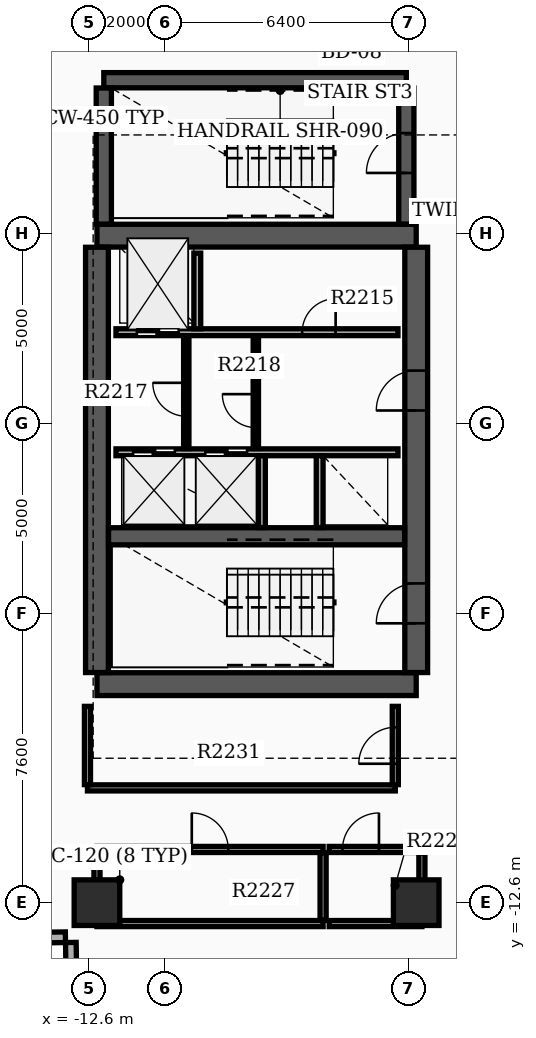
"""IFC4 building model, lengths in metres.
Left out: names, types, materials, properties, quantities, classifications, styles, units other than length and angle.
Written with IfcOpenShell. Run it as: python <this file> out.ifc"""

import sys

from ifc_helpers import new_model, si_unit, direction, frame, frame_2d, origin, origin_2d, place, context, subcontext, project, spatial, rectangle, extrude, element, fill, save


model = new_model("IFC4")
c1 = context("Model", 3, precision=1e-05, world=origin(), true_north=direction((0.0, 1.0)))
c2 = subcontext(c1, "Body", "Model", "MODEL_VIEW")
j1 = project(units=[si_unit("LENGTHUNIT", "METRE"), si_unit("PLANEANGLEUNIT", "RADIAN")], contexts=[c1])
p1 = place(None, origin())
s1 = spatial("IfcSite", under=j1, at=p1, CompositionType="ELEMENT")
p2 = place(p1, origin())
s2 = spatial("IfcBuilding", under=s1, at=p2, CompositionType="ELEMENT")
p3 = place(p2, frame((0.0, 0.0, 139.8)))
s3 = spatial("IfcBuildingStorey", under=s2, at=p3, CompositionType="ELEMENT", Elevation=139.8)
for number, where, z_axis, x_axis in (
    (1, (-12.4, -6.85, 0.0), (0.0, 0.0, 1.0), (1.0, 0.0, 0.0)),
    (2, (-12.4, 4.95, 0.0), (0.0, 0.0, 1.0), (1.0, 0.0, 0.0)),
):
    element("IfcWall", number, at=place(p3, frame(where, z_axis=z_axis, x_axis=x_axis)), inside=s3, PredefinedType="SHEAR", context=c2, shape_type="SweptSolid", body=[
        extrude(rectangle(XDim=8.4, YDim=0.6, at=frame_2d((4.2, 0.0))), origin(), (0.0, 0.0, 1.0), 3.65),
    ])
p4 = place(p3, frame((-12.4, -6.545, 0.0), z_axis=(0.0, 0.0, 1.0), x_axis=(0.0, 1.0, 0.0)))
e3 = element("IfcWall", 3, at=p4, inside=s3, PredefinedType="SHEAR", context=c2, shape_type="SweptSolid", body=[
    extrude(rectangle(XDim=11.19, YDim=0.6, at=frame_2d((5.595, 0.0))), origin(), (0.0, 0.0, 1.0), 3.65),
])
p5 = place(p3, frame((-4.0, -6.545, 0.0), z_axis=(0.0, 0.0, 1.0), x_axis=(0.0, 1.0, 0.0)))
e4 = element("IfcWall", 4, at=p5, inside=s3, PredefinedType="SHEAR", context=c2, shape_type="SweptSolid", body=[
    extrude(rectangle(XDim=11.19, YDim=0.6, at=frame_2d((5.595, 0.0))), origin(), (0.0, 0.0, 1.0), 3.65),
])
p6 = place(p5, frame((1.295, 0.0, 0.0)))
e5 = element("IfcOpeningElement", 5, at=p6, cuts=e4, PredefinedType="OPENING", context=c2, shape_type="SweptSolid", body=[
    extrude(rectangle(XDim=1.05, YDim=2.15, at=frame_2d((0.525, 1.075))), frame((0.0, 0.31, 0.0), z_axis=(0.0, -1.0, 0.0), x_axis=(1.0, 0.0, 0.0)), (0.0, 0.0, 1.0), 0.62),
])
p7 = place(p5, frame((6.895, 0.0, 0.0)))
e6 = element("IfcOpeningElement", 6, at=p7, cuts=e4, PredefinedType="OPENING", context=c2, shape_type="SweptSolid", body=[
    extrude(rectangle(XDim=1.05, YDim=2.15, at=frame_2d((0.525, 1.075))), frame((0.0, 0.31, 0.0), z_axis=(0.0, -1.0, 0.0), x_axis=(1.0, 0.0, 0.0)), (0.0, 0.0, 1.0), 0.62),
])
p8 = place(p3, frame((-12.095, -2.96, 0.0), z_axis=(0.0, 0.0, 1.0), x_axis=(1.0, 0.0, 0.0)))
e7 = element("IfcWall", 7, at=p8, inside=s3, PredefinedType="SHEAR", context=c2, shape_type="SweptSolid", body=[
    extrude(rectangle(XDim=7.79, YDim=0.45, at=frame_2d((3.895, 0.0))), origin(), (0.0, 0.0, 1.0), 3.65),
])
p9 = place(p3, frame((-12.22, 9.04, 0.0), z_axis=(0.0, 0.0, 1.0), x_axis=(1.0, 0.0, 0.0)))
e8 = element("IfcWall", 8, at=p9, inside=s3, PredefinedType="SHEAR", context=c2, shape_type="SweptSolid", body=[
    extrude(rectangle(XDim=7.96, YDim=0.4, at=frame_2d((3.98, 0.0))), origin(), (0.0, 0.0, 1.0), 3.65),
])
p10 = place(p3, frame((-12.22, 5.255, 0.0), z_axis=(0.0, 0.0, 1.0), x_axis=(0.0, 1.0, 0.0)))
e9 = element("IfcWall", 9, at=p10, inside=s3, PredefinedType="SHEAR", context=c2, shape_type="SweptSolid", body=[
    extrude(rectangle(XDim=3.58, YDim=0.4, at=frame_2d((1.79, 0.0))), origin(), (0.0, 0.0, 1.0), 3.65),
])
p11 = place(p3, frame((-4.26, 5.255, 0.0), z_axis=(0.0, 0.0, 1.0), x_axis=(0.0, 1.0, 0.0)))
e10 = element("IfcWall", 10, at=p11, inside=s3, PredefinedType="SHEAR", context=c2, shape_type="SweptSolid", body=[
    extrude(rectangle(XDim=3.58, YDim=0.4, at=frame_2d((1.79, 0.0))), origin(), (0.0, 0.0, 1.0), 3.65),
])
p12 = place(p11, frame((1.345, 0.0, 0.0)))
e11 = element("IfcOpeningElement", 11, at=p12, cuts=e10, PredefinedType="OPENING", context=c2, shape_type="SweptSolid", body=[
    extrude(rectangle(XDim=1.05, YDim=2.15, at=frame_2d((0.525, 1.075))), frame((0.0, 0.21, 0.0), z_axis=(0.0, -1.0, 0.0), x_axis=(1.0, 0.0, 0.0)), (0.0, 0.0, 1.0), 0.42),
])
for number, where, z_axis, x_axis in (
    (12, (-12.4, -12.6, 0.0), (0.0, 0.0, 1.0), (1.0, 0.0, 0.0)),
    (13, (-4.0, -12.6, 0.0), (0.0, 0.0, 1.0), (1.0, 0.0, 0.0)),
):
    element("IfcColumn", number, at=place(p3, frame(where, z_axis=z_axis, x_axis=x_axis)), inside=s3, PredefinedType="COLUMN", context=c2, shape_type="SweptSolid", body=[
        extrude(rectangle(XDim=1.2, YDim=1.2, at=origin_2d()), origin(), (0.0, 0.0, 1.0), 3.9),
    ])
p13 = place(p3, frame((-14.449, -13.529, 0.0), z_axis=(0.0, 0.0, 1.0), x_axis=(0.999878147354, 0.015610587569, 0.0)))
e14 = element("IfcWall", 14, at=p13, inside=s3, PredefinedType="STANDARD", context=c2, shape_type="SweptSolid", body=[
    extrude(rectangle(XDim=1.22, YDim=0.28, at=frame_2d((0.61, 0.0))), origin(), (0.0, 0.0, 1.0), 2.92),
])
p14 = place(p3, frame((-13.087, -13.647, 0.0), z_axis=(0.0, 0.0, 1.0), x_axis=(0.015785793208, -0.999875396603, 0.0)))
e15 = element("IfcWall", 15, at=p14, inside=s3, PredefinedType="STANDARD", context=c2, shape_type="SweptSolid", body=[
    extrude(rectangle(XDim=1.5, YDim=0.28, at=frame_2d((0.75, 0.0))), origin(), (0.0, 0.0, 1.0), 2.92),
])
p15 = place(p3, frame((-11.9, 2.41, 0.0), z_axis=(0.0, 0.0, 1.0), x_axis=(1.0, 0.0, 0.0)))
e16 = element("IfcWall", 16, at=p15, inside=s3, PredefinedType="SOLIDWALL", context=c2, shape_type="SweptSolid", body=[
    extrude(rectangle(XDim=7.42, YDim=0.18, at=frame_2d((3.71, 0.0))), origin(), (0.0, 0.0, 1.0), 2.91),
])
p16 = place(p15, frame((0.55, 0.0, 0.0)))
e17 = element("IfcOpeningElement", 17, at=p16, cuts=e16, PredefinedType="OPENING", context=c2, shape_type="SweptSolid", body=[
    extrude(rectangle(XDim=1.1, YDim=2.15, at=frame_2d((0.55, 1.075))), frame((0.0, 0.1, 0.0), z_axis=(0.0, -1.0, 0.0), x_axis=(1.0, 0.0, 0.0)), (0.0, 0.0, 1.0), 0.2),
])
p17 = place(p15, frame((4.9, 0.0, 0.0)))
e18 = element("IfcOpeningElement", 18, at=p17, cuts=e16, PredefinedType="OPENING", context=c2, shape_type="SweptSolid", body=[
    extrude(rectangle(XDim=0.88, YDim=2.1, at=frame_2d((0.44, 1.05))), frame((0.0, 0.1, 0.0), z_axis=(0.0, -1.0, 0.0), x_axis=(1.0, 0.0, 0.0)), (0.0, 0.0, 1.0), 0.2),
])
p18 = place(p3, frame((-11.9, -0.75, 0.0), z_axis=(0.0, 0.0, 1.0), x_axis=(1.0, 0.0, 0.0)))
e19 = element("IfcWall", 19, at=p18, inside=s3, PredefinedType="SOLIDWALL", context=c2, shape_type="SweptSolid", body=[
    extrude(rectangle(XDim=7.42, YDim=0.18, at=frame_2d((3.71, 0.0))), origin(), (0.0, 0.0, 1.0), 2.91),
])
p19 = place(p18, frame((0.45, 0.0, 0.0)))
e20 = element("IfcOpeningElement", 20, at=p19, cuts=e19, PredefinedType="OPENING", context=c2, shape_type="SweptSolid", body=[
    extrude(rectangle(XDim=1.1, YDim=2.15, at=frame_2d((0.55, 1.075))), frame((0.0, 0.1, 0.0), z_axis=(0.0, -1.0, 0.0), x_axis=(1.0, 0.0, 0.0)), (0.0, 0.0, 1.0), 0.2),
])
p20 = place(p18, frame((2.35, 0.0, 0.0)))
e21 = element("IfcOpeningElement", 21, at=p20, cuts=e19, PredefinedType="OPENING", context=c2, shape_type="SweptSolid", body=[
    extrude(rectangle(XDim=1.1, YDim=2.15, at=frame_2d((0.55, 1.075))), frame((0.0, 0.1, 0.0), z_axis=(0.0, -1.0, 0.0), x_axis=(1.0, 0.0, 0.0)), (0.0, 0.0, 1.0), 0.2),
])
p21 = place(p3, frame((-9.76, 2.5, 0.0), z_axis=(0.0, 0.0, 1.0), x_axis=(0.0, 1.0, 0.0)))
e22 = element("IfcWall", 22, at=p21, inside=s3, PredefinedType="SOLIDWALL", context=c2, shape_type="SweptSolid", body=[
    extrude(rectangle(XDim=1.99, YDim=0.18, at=frame_2d((0.995, 0.0))), origin(), (0.0, 0.0, 1.0), 2.91),
])
for number, where, z_axis, x_axis in (
    (23, (-8.06, -2.73, 0.0), (0.0, 0.0, 1.0), (0.0, 1.0, 0.0)),
    (24, (-6.54, -2.73, 0.0), (0.0, 0.0, 1.0), (0.0, 1.0, 0.0)),
):
    element("IfcWall", number, at=place(p3, frame(where, z_axis=z_axis, x_axis=x_axis)), inside=s3, PredefinedType="SOLIDWALL", context=c2, shape_type="SweptSolid", body=[
        extrude(rectangle(XDim=1.89, YDim=0.18, at=frame_2d((0.945, 0.0))), origin(), (0.0, 0.0, 1.0), 2.91),
    ])
p22 = place(p3, frame((-8.22, -0.65, 0.0), z_axis=(0.0, 0.0, 1.0), x_axis=(0.0, 1.0, 0.0)))
e25 = element("IfcWall", 25, at=p22, inside=s3, PredefinedType="SOLIDWALL", context=c2, shape_type="SweptSolid", body=[
    extrude(rectangle(XDim=2.96, YDim=0.14, at=frame_2d((1.48, 0.0))), origin(), (0.0, 0.0, 1.0), 2.91),
])
p23 = place(p22, frame((0.55, 0.0, 0.0)))
e26 = element("IfcOpeningElement", 26, at=p23, cuts=e25, PredefinedType="OPENING", context=c2, shape_type="SweptSolid", body=[
    extrude(rectangle(XDim=0.88, YDim=2.1, at=frame_2d((0.44, 1.05))), frame((0.0, 0.08, 0.0), z_axis=(0.0, -1.0, 0.0), x_axis=(1.0, 0.0, 0.0)), (0.0, 0.0, 1.0), 0.16),
])
p24 = place(p3, frame((-10.05, -0.652, 0.0), z_axis=(0.0, 0.0, 1.0), x_axis=(0.0, 1.0, 0.0)))
e27 = element("IfcWall", 27, at=p24, inside=s3, PredefinedType="PARTITIONING", context=c2, shape_type="SweptSolid", body=[
    extrude(rectangle(XDim=2.962, YDim=0.14, at=frame_2d((1.481, 0.0))), origin(), (0.0, 0.0, 1.0), 2.91),
])
p25 = place(p24, frame((0.85, 0.0, 0.0)))
e28 = element("IfcOpeningElement", 28, at=p25, cuts=e27, PredefinedType="OPENING", context=c2, shape_type="SweptSolid", body=[
    extrude(rectangle(XDim=0.88, YDim=2.1, at=frame_2d((0.44, 1.05))), frame((0.0, 0.08, 0.0), z_axis=(0.0, -1.0, 0.0), x_axis=(1.0, 0.0, 0.0)), (0.0, 0.0, 1.0), 0.16),
])
p26 = place(p3, frame((-12.4, -13.15, 0.0), z_axis=(0.0, 0.0, 1.0), x_axis=(1.0, 0.0, 0.0)))
e29 = element("IfcWall", 29, at=p26, inside=s3, PredefinedType="PARTITIONING", context=c2, shape_type="SweptSolid", body=[
    extrude(rectangle(XDim=5.95, YDim=0.16, at=frame_2d((2.975, 0.0))), origin(), (0.0, 0.0, 1.0), 2.91),
])
p27 = place(p3, frame((-12.4, -11.2, 0.0), z_axis=(0.0, 0.0, 1.0), x_axis=(1.0, 0.0, 0.0)))
e30 = element("IfcWall", 30, at=p27, inside=s3, PredefinedType="PARTITIONING", context=c2, shape_type="SweptSolid", body=[
    extrude(rectangle(XDim=5.95, YDim=0.16, at=frame_2d((2.975, 0.0))), origin(), (0.0, 0.0, 1.0), 2.91),
])
p28 = place(p27, frame((2.495, 0.0, 0.0)))
e31 = element("IfcOpeningElement", 31, at=p28, cuts=e30, PredefinedType="OPENING", context=c2, shape_type="SweptSolid", body=[
    extrude(rectangle(XDim=0.96, YDim=2.15, at=frame_2d((0.48, 1.075))), frame((0.0, 0.09, 0.0), z_axis=(0.0, -1.0, 0.0), x_axis=(1.0, 0.0, 0.0)), (0.0, 0.0, 1.0), 0.18),
])
for number, where, z_axis, x_axis in (
    (32, (-12.4, -13.065, 0.0), (0.0, 0.0, 1.0), (0.0, 1.0, 0.0)),
    (33, (-6.45, -13.065, 0.0), (0.0, 0.0, 1.0), (0.0, 1.0, 0.0)),
):
    element("IfcWall", number, at=place(p3, frame(where, z_axis=z_axis, x_axis=x_axis)), inside=s3, PredefinedType="PARTITIONING", context=c2, shape_type="SweptSolid", body=[
        extrude(rectangle(XDim=1.78, YDim=0.16, at=frame_2d((0.89, 0.0))), origin(), (0.0, 0.0, 1.0), 2.91),
    ])
p29 = place(p3, frame((-6.29, -13.15, 0.0), z_axis=(0.0, 0.0, 1.0), x_axis=(1.0, 0.0, 0.0)))
e34 = element("IfcWall", 34, at=p29, inside=s3, PredefinedType="PARTITIONING", context=c2, shape_type="SweptSolid", body=[
    extrude(rectangle(XDim=2.44, YDim=0.16, at=frame_2d((1.22, 0.0))), origin(), (0.0, 0.0, 1.0), 2.91),
])
p30 = place(p3, frame((-6.29, -11.2, 0.0), z_axis=(0.0, 0.0, 1.0), x_axis=(1.0, 0.0, 0.0)))
e35 = element("IfcWall", 35, at=p30, inside=s3, PredefinedType="PARTITIONING", context=c2, shape_type="SweptSolid", body=[
    extrude(rectangle(XDim=2.44, YDim=0.16, at=frame_2d((1.22, 0.0))), origin(), (0.0, 0.0, 1.0), 2.91),
])
p31 = place(p30, frame((0.35, 0.0, 0.0)))
e36 = element("IfcOpeningElement", 36, at=p31, cuts=e35, PredefinedType="OPENING", context=c2, shape_type="SweptSolid", body=[
    extrude(rectangle(XDim=0.96, YDim=2.15, at=frame_2d((0.48, 1.075))), frame((0.0, 0.09, 0.0), z_axis=(0.0, -1.0, 0.0), x_axis=(1.0, 0.0, 0.0)), (0.0, 0.0, 1.0), 0.18),
])
p32 = place(p3, frame((-3.85, -13.065, 0.0), z_axis=(0.0, 0.0, 1.0), x_axis=(0.0, 1.0, 0.0)))
e37 = element("IfcWall", 37, at=p32, inside=s3, PredefinedType="PARTITIONING", context=c2, shape_type="SweptSolid", body=[
    extrude(rectangle(XDim=1.78, YDim=0.16, at=frame_2d((0.89, 0.0))), origin(), (0.0, 0.0, 1.0), 2.91),
])
p33 = place(p3, frame((-12.65, -9.58, 0.0), z_axis=(0.0, 0.0, 1.0), x_axis=(1.0, 0.0, 0.0)))
e38 = element("IfcWall", 38, at=p33, inside=s3, PredefinedType="PARTITIONING", context=c2, shape_type="SweptSolid", body=[
    extrude(rectangle(XDim=8.1, YDim=0.16, at=frame_2d((4.05, 0.0))), origin(), (0.0, 0.0, 1.0), 2.91),
])
p34 = place(p3, frame((-12.65, -9.495, 0.0), z_axis=(0.0, 0.0, 1.0), x_axis=(0.0, 1.0, 0.0)))
e39 = element("IfcWall", 39, at=p34, inside=s3, PredefinedType="PARTITIONING", context=c2, shape_type="SweptSolid", body=[
    extrude(rectangle(XDim=2.06, YDim=0.16, at=frame_2d((1.03, 0.0))), origin(), (0.0, 0.0, 1.0), 2.91),
])
p35 = place(p3, frame((-4.55, -9.495, 0.0), z_axis=(0.0, 0.0, 1.0), x_axis=(0.0, 1.0, 0.0)))
e40 = element("IfcWall", 40, at=p35, inside=s3, PredefinedType="PARTITIONING", context=c2, shape_type="SweptSolid", body=[
    extrude(rectangle(XDim=2.06, YDim=0.16, at=frame_2d((1.03, 0.0))), origin(), (0.0, 0.0, 1.0), 2.91),
])
p36 = place(p35, frame((0.55, 0.0, 0.0)))
e41 = element("IfcOpeningElement", 41, at=p36, cuts=e40, PredefinedType="OPENING", context=c2, shape_type="SweptSolid", body=[
    extrude(rectangle(XDim=0.96, YDim=2.15, at=frame_2d((0.48, 1.075))), frame((0.0, 0.09, 0.0), z_axis=(0.0, -1.0, 0.0), x_axis=(1.0, 0.0, 0.0)), (0.0, 0.0, 1.0), 0.18),
])
p37 = place(p6, origin())
e42 = element("IfcDoor", 42, at=p37, inside=s3, OperationType="SINGLE_SWING_LEFT", PredefinedType="DOOR", context=c2, shape_type="SweptSolid", body=[
    extrude(rectangle(XDim=1.05, YDim=2.15, at=frame_2d((0.525, 1.075))), frame((0.0, 0.025, 0.0), z_axis=(0.0, -1.0, 0.0), x_axis=(1.0, 0.0, 0.0)), (0.0, 0.0, 1.0), 0.05),
])
fill(e5, e42)
p38 = place(p7, origin())
e43 = element("IfcDoor", 43, at=p38, inside=s3, OperationType="SINGLE_SWING_LEFT", PredefinedType="DOOR", context=c2, shape_type="SweptSolid", body=[
    extrude(rectangle(XDim=1.05, YDim=2.15, at=frame_2d((0.525, 1.075))), frame((0.0, 0.025, 0.0), z_axis=(0.0, -1.0, 0.0), x_axis=(1.0, 0.0, 0.0)), (0.0, 0.0, 1.0), 0.05),
])
fill(e6, e43)
p39 = place(p12, origin())
e44 = element("IfcDoor", 44, at=p39, inside=s3, OperationType="SINGLE_SWING_LEFT", PredefinedType="DOOR", context=c2, shape_type="SweptSolid", body=[
    extrude(rectangle(XDim=1.05, YDim=2.15, at=frame_2d((0.525, 1.075))), frame((0.0, 0.025, 0.0), z_axis=(0.0, -1.0, 0.0), x_axis=(1.0, 0.0, 0.0)), (0.0, 0.0, 1.0), 0.05),
])
fill(e11, e44)
p40 = place(p16, origin())
e45 = element("IfcDoor", 45, at=p40, inside=s3, OperationType="DOUBLE_DOOR_SLIDING", PredefinedType="DOOR", context=c2, shape_type="SweptSolid", body=[
    extrude(rectangle(XDim=1.1, YDim=2.15, at=frame_2d((0.55, 1.075))), frame((0.0, 0.025, 0.0), z_axis=(0.0, -1.0, 0.0), x_axis=(1.0, 0.0, 0.0)), (0.0, 0.0, 1.0), 0.05),
])
fill(e17, e45)
p41 = place(p19, origin())
e46 = element("IfcDoor", 46, at=p41, inside=s3, OperationType="DOUBLE_DOOR_SLIDING", PredefinedType="DOOR", context=c2, shape_type="SweptSolid", body=[
    extrude(rectangle(XDim=1.1, YDim=2.15, at=frame_2d((0.55, 1.075))), frame((0.0, 0.025, 0.0), z_axis=(0.0, -1.0, 0.0), x_axis=(1.0, 0.0, 0.0)), (0.0, 0.0, 1.0), 0.05),
])
fill(e20, e46)
p42 = place(p20, origin())
e47 = element("IfcDoor", 47, at=p42, inside=s3, OperationType="DOUBLE_DOOR_SLIDING", PredefinedType="DOOR", context=c2, shape_type="SweptSolid", body=[
    extrude(rectangle(XDim=1.1, YDim=2.15, at=frame_2d((0.55, 1.075))), frame((0.0, 0.025, 0.0), z_axis=(0.0, -1.0, 0.0), x_axis=(1.0, 0.0, 0.0)), (0.0, 0.0, 1.0), 0.05),
])
fill(e21, e47)
p43 = place(p17, origin())
e48 = element("IfcDoor", 48, at=p43, inside=s3, OperationType="SINGLE_SWING_RIGHT", PredefinedType="DOOR", context=c2, shape_type="SweptSolid", body=[
    extrude(rectangle(XDim=0.88, YDim=2.1, at=frame_2d((0.44, 1.05))), frame((0.0, 0.025, 0.0), z_axis=(0.0, -1.0, 0.0), x_axis=(1.0, 0.0, 0.0)), (0.0, 0.0, 1.0), 0.05),
])
fill(e18, e48)
p44 = place(p23, origin())
e49 = element("IfcDoor", 49, at=p44, inside=s3, OperationType="SINGLE_SWING_RIGHT", PredefinedType="DOOR", context=c2, shape_type="SweptSolid", body=[
    extrude(rectangle(XDim=0.88, YDim=2.1, at=frame_2d((0.44, 1.05))), frame((0.0, 0.025, 0.0), z_axis=(0.0, -1.0, 0.0), x_axis=(1.0, 0.0, 0.0)), (0.0, 0.0, 1.0), 0.05),
])
fill(e26, e49)
p45 = place(p25, origin())
e50 = element("IfcDoor", 50, at=p45, inside=s3, OperationType="SINGLE_SWING_RIGHT", PredefinedType="DOOR", context=c2, shape_type="SweptSolid", body=[
    extrude(rectangle(XDim=0.88, YDim=2.1, at=frame_2d((0.44, 1.05))), frame((0.0, 0.025, 0.0), z_axis=(0.0, -1.0, 0.0), x_axis=(1.0, 0.0, 0.0)), (0.0, 0.0, 1.0), 0.05),
])
fill(e28, e50)
p46 = place(p28, origin())
e51 = element("IfcDoor", 51, at=p46, inside=s3, OperationType="SINGLE_SWING_LEFT", PredefinedType="DOOR", context=c2, shape_type="SweptSolid", body=[
    extrude(rectangle(XDim=0.96, YDim=2.15, at=frame_2d((0.48, 1.075))), frame((0.0, 0.025, 0.0), z_axis=(0.0, -1.0, 0.0), x_axis=(1.0, 0.0, 0.0)), (0.0, 0.0, 1.0), 0.05),
])
fill(e31, e51)
p47 = place(p31, origin())
e52 = element("IfcDoor", 52, at=p47, inside=s3, OperationType="SINGLE_SWING_RIGHT", PredefinedType="DOOR", context=c2, shape_type="SweptSolid", body=[
    extrude(rectangle(XDim=0.96, YDim=2.15, at=frame_2d((0.48, 1.075))), frame((0.0, 0.025, 0.0), z_axis=(0.0, -1.0, 0.0), x_axis=(1.0, 0.0, 0.0)), (0.0, 0.0, 1.0), 0.05),
])
fill(e36, e52)
p48 = place(p36, origin())
e53 = element("IfcDoor", 53, at=p48, inside=s3, OperationType="SINGLE_SWING_LEFT", PredefinedType="DOOR", context=c2, shape_type="SweptSolid", body=[
    extrude(rectangle(XDim=0.96, YDim=2.15, at=frame_2d((0.48, 1.075))), frame((0.0, 0.025, 0.0), z_axis=(0.0, -1.0, 0.0), x_axis=(1.0, 0.0, 0.0)), (0.0, 0.0, 1.0), 0.05),
])
fill(e41, e53)
save(model, sys.argv[1])
